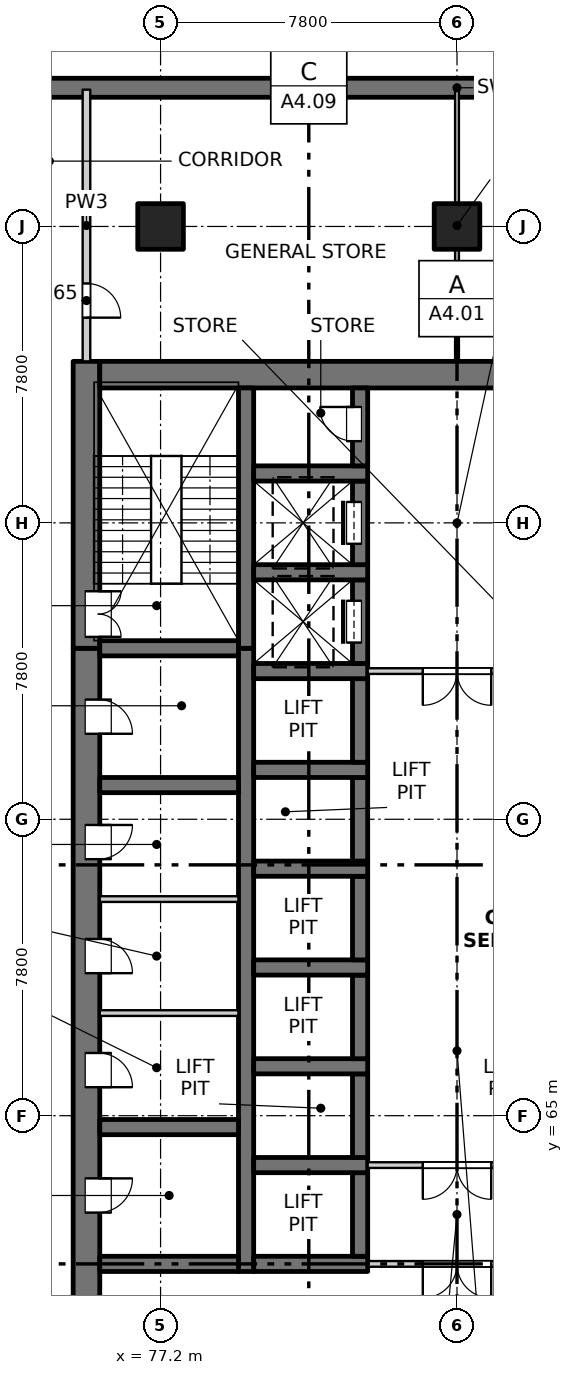
"""IFC4 building model, lengths in metres.
Left out: names, types, materials, properties, quantities, classifications, styles, units other than length and angle.
Written with IfcOpenShell. Run it as: python <this file> out.ifc"""

import sys

from ifc_helpers import new_model, si_unit, direction, frame, frame_2d, origin, origin_2d, place, context, subcontext, project, spatial, rectangle, extrude, element, fill, save


model = new_model("IFC4")
c1 = context("Model", 3, precision=1e-05, world=origin(), true_north=direction((0.0, 1.0)))
c2 = subcontext(c1, "Body", "Model", "MODEL_VIEW")
j1 = project(units=[si_unit("LENGTHUNIT", "METRE"), si_unit("PLANEANGLEUNIT", "RADIAN")], contexts=[c1])
p1 = place(None, origin())
s1 = spatial("IfcSite", under=j1, at=p1, CompositionType="ELEMENT")
p2 = place(p1, origin())
s2 = spatial("IfcBuilding", under=s1, at=p2, CompositionType="ELEMENT")
p3 = place(p2, frame((0.0, 0.0, -4.5)))
s3 = spatial("IfcBuildingStorey", under=s2, at=p3, CompositionType="ELEMENT", Elevation=-4.5)
p4 = place(p3, frame((42.6, 92.05, -0.35), z_axis=(0.0, 0.0, 1.0), x_axis=(1.0, 0.0, 0.0)))
e1 = element("IfcWall", 1, at=p4, inside=s3, PredefinedType="SOLIDWALL", context=c2, shape_type="SweptSolid", body=[
    extrude(rectangle(XDim=84.8, YDim=0.5, at=frame_2d((42.4, 0.0))), origin(), (0.0, 0.0, 1.0), 4.45),
])
for number, where, z_axis, x_axis in (
    (2, (77.2, 88.4, -0.35), (0.0, 0.0, 1.0), (1.0, 0.0, 0.0)),
    (3, (85.0, 88.4, -0.35), (0.0, 0.0, 1.0), (1.0, 0.0, 0.0)),
):
    element("IfcColumn", number, at=place(p3, frame(where, z_axis=z_axis, x_axis=x_axis)), inside=s3, PredefinedType="COLUMN", context=c2, shape_type="SweptSolid", body=[
        extrude(rectangle(XDim=1.2, YDim=1.2, at=origin_2d()), origin(), (0.0, 0.0, 1.0), 4.45),
    ])
p5 = place(p3, frame((75.25, 54.9, -0.35), z_axis=(0.0, 0.0, 1.0), x_axis=(0.0, 1.0, 0.0)))
e4 = element("IfcWall", 4, at=p5, inside=s3, PredefinedType="SOLIDWALL", context=c2, shape_type="SweptSolid", body=[
    extrude(rectangle(XDim=22.4, YDim=0.7, at=frame_2d((11.2, 0.0))), origin(), (0.0, 0.0, 1.0), 4.45),
])
p6 = place(p5, frame((7.55, 0.0, 0.35)))
e5 = element("IfcOpeningElement", 5, at=p6, cuts=e4, PredefinedType="OPENING", context=c2, shape_type="SweptSolid", body=[
    extrude(rectangle(XDim=0.9, YDim=2.1, at=frame_2d((0.45, 1.05))), frame((0.0, 0.36, 0.0), z_axis=(0.0, -1.0, 0.0), x_axis=(1.0, 0.0, 0.0)), (0.0, 0.0, 1.0), 0.72),
])
p7 = place(p5, frame((10.85, 0.0, 0.35)))
e6 = element("IfcOpeningElement", 6, at=p7, cuts=e4, PredefinedType="OPENING", context=c2, shape_type="SweptSolid", body=[
    extrude(rectangle(XDim=0.9, YDim=2.1, at=frame_2d((0.45, 1.05))), frame((0.0, 0.36, 0.0), z_axis=(0.0, -1.0, 0.0), x_axis=(1.0, 0.0, 0.0)), (0.0, 0.0, 1.0), 0.72),
])
p8 = place(p5, frame((13.85, 0.0, 0.35)))
e7 = element("IfcOpeningElement", 7, at=p8, cuts=e4, PredefinedType="OPENING", context=c2, shape_type="SweptSolid", body=[
    extrude(rectangle(XDim=0.9, YDim=2.1, at=frame_2d((0.45, 1.05))), frame((0.0, 0.36, 0.0), z_axis=(0.0, -1.0, 0.0), x_axis=(1.0, 0.0, 0.0)), (0.0, 0.0, 1.0), 0.72),
])
p9 = place(p5, frame((16.85, 0.0, 0.35)))
e8 = element("IfcOpeningElement", 8, at=p9, cuts=e4, PredefinedType="OPENING", context=c2, shape_type="SweptSolid", body=[
    extrude(rectangle(XDim=0.9, YDim=2.1, at=frame_2d((0.45, 1.05))), frame((0.0, 0.36, 0.0), z_axis=(0.0, -1.0, 0.0), x_axis=(1.0, 0.0, 0.0)), (0.0, 0.0, 1.0), 0.72),
])
p10 = place(p5, frame((20.15, 0.0, 0.35)))
e9 = element("IfcOpeningElement", 9, at=p10, cuts=e4, PredefinedType="OPENING", context=c2, shape_type="SweptSolid", body=[
    extrude(rectangle(XDim=0.9, YDim=2.1, at=frame_2d((0.45, 1.05))), frame((0.0, 0.36, 0.0), z_axis=(0.0, -1.0, 0.0), x_axis=(1.0, 0.0, 0.0)), (0.0, 0.0, 1.0), 0.72),
])
p11 = place(p3, frame((75.25, 77.3, -0.35), z_axis=(0.0, 0.0, 1.0), x_axis=(0.0, 1.0, 0.0)))
e10 = element("IfcWall", 10, at=p11, inside=s3, PredefinedType="SOLIDWALL", context=c2, shape_type="SweptSolid", body=[
    extrude(rectangle(XDim=7.55, YDim=0.7, at=frame_2d((3.775, 0.0))), origin(), (0.0, 0.0, 1.0), 4.45),
])
p12 = place(p11, frame((0.3, 0.0, 0.35)))
e11 = element("IfcOpeningElement", 11, at=p12, cuts=e10, PredefinedType="OPENING", context=c2, shape_type="SweptSolid", body=[
    extrude(rectangle(XDim=1.2, YDim=2.1, at=frame_2d((0.6, 1.05))), frame((0.0, 0.36, 0.0), z_axis=(0.0, -1.0, 0.0), x_axis=(1.0, 0.0, 0.0)), (0.0, 0.0, 1.0), 0.72),
])
p13 = place(p3, frame((75.6, 84.5, -0.35), z_axis=(0.0, 0.0, 1.0), x_axis=(1.0, 0.0, 0.0)))
e12 = element("IfcWall", 12, at=p13, inside=s3, PredefinedType="SOLIDWALL", context=c2, shape_type="SweptSolid", body=[
    extrude(rectangle(XDim=18.8, YDim=0.7, at=frame_2d((9.4, 0.0))), origin(), (0.0, 0.0, 1.0), 4.45),
])
p14 = place(p3, frame((79.45, 60.9, -0.35), z_axis=(0.0, 0.0, 1.0), x_axis=(0.0, 1.0, 0.0)))
e13 = element("IfcWall", 13, at=p14, inside=s3, PredefinedType="SOLIDWALL", context=c2, shape_type="SweptSolid", body=[
    extrude(rectangle(XDim=16.4, YDim=0.4, at=frame_2d((8.2, 0.0))), origin(), (0.0, 0.0, 1.0), 4.45),
])
p15 = place(p3, frame((79.45, 77.3, -0.35), z_axis=(0.0, 0.0, 1.0), x_axis=(0.0, 1.0, 0.0)))
e14 = element("IfcWall", 14, at=p15, inside=s3, PredefinedType="SOLIDWALL", context=c2, shape_type="SweptSolid", body=[
    extrude(rectangle(XDim=6.85, YDim=0.4, at=frame_2d((3.425, 0.0))), origin(), (0.0, 0.0, 1.0), 4.45),
])
p16 = place(p3, frame((79.65, 61.1, -0.35), z_axis=(0.0, 0.0, 1.0), x_axis=(1.0, 0.0, 0.0)))
e15 = element("IfcWall", 15, at=p16, inside=s3, PredefinedType="SOLIDWALL", context=c2, shape_type="SweptSolid", body=[
    extrude(rectangle(XDim=3.0, YDim=0.4, at=frame_2d((1.5, 0.0))), origin(), (0.0, 0.0, 1.0), 4.45),
])
p17 = place(p3, frame((82.45, 61.3, -0.35), z_axis=(0.0, 0.0, 1.0), x_axis=(0.0, 1.0, 0.0)))
e16 = element("IfcWall", 16, at=p17, inside=s3, PredefinedType="SOLIDWALL", context=c2, shape_type="SweptSolid", body=[
    extrude(rectangle(XDim=2.2, YDim=0.4, at=frame_2d((1.1, 0.0))), origin(), (0.0, 0.0, 1.0), 4.45),
])
p18 = place(p3, frame((79.65, 63.7, -0.35), z_axis=(0.0, 0.0, 1.0), x_axis=(1.0, 0.0, 0.0)))
e17 = element("IfcWall", 17, at=p18, inside=s3, PredefinedType="SOLIDWALL", context=c2, shape_type="SweptSolid", body=[
    extrude(rectangle(XDim=3.0, YDim=0.4, at=frame_2d((1.5, 0.0))), origin(), (0.0, 0.0, 1.0), 4.45),
])
p19 = place(p3, frame((82.45, 63.9, -0.35), z_axis=(0.0, 0.0, 1.0), x_axis=(0.0, 1.0, 0.0)))
e18 = element("IfcWall", 18, at=p19, inside=s3, PredefinedType="SOLIDWALL", context=c2, shape_type="SweptSolid", body=[
    extrude(rectangle(XDim=2.2, YDim=0.4, at=frame_2d((1.1, 0.0))), origin(), (0.0, 0.0, 1.0), 4.45),
])
p20 = place(p3, frame((79.65, 66.3, -0.35), z_axis=(0.0, 0.0, 1.0), x_axis=(1.0, 0.0, 0.0)))
e19 = element("IfcWall", 19, at=p20, inside=s3, PredefinedType="SOLIDWALL", context=c2, shape_type="SweptSolid", body=[
    extrude(rectangle(XDim=3.0, YDim=0.4, at=frame_2d((1.5, 0.0))), origin(), (0.0, 0.0, 1.0), 4.45),
])
p21 = place(p3, frame((82.45, 66.5, -0.35), z_axis=(0.0, 0.0, 1.0), x_axis=(0.0, 1.0, 0.0)))
e20 = element("IfcWall", 20, at=p21, inside=s3, PredefinedType="SOLIDWALL", context=c2, shape_type="SweptSolid", body=[
    extrude(rectangle(XDim=2.2, YDim=0.4, at=frame_2d((1.1, 0.0))), origin(), (0.0, 0.0, 1.0), 4.45),
])
p22 = place(p3, frame((79.65, 68.9, -0.35), z_axis=(0.0, 0.0, 1.0), x_axis=(1.0, 0.0, 0.0)))
e21 = element("IfcWall", 21, at=p22, inside=s3, PredefinedType="SOLIDWALL", context=c2, shape_type="SweptSolid", body=[
    extrude(rectangle(XDim=3.0, YDim=0.4, at=frame_2d((1.5, 0.0))), origin(), (0.0, 0.0, 1.0), 4.45),
])
p23 = place(p3, frame((82.45, 69.1, -0.35), z_axis=(0.0, 0.0, 1.0), x_axis=(0.0, 1.0, 0.0)))
e22 = element("IfcWall", 22, at=p23, inside=s3, PredefinedType="SOLIDWALL", context=c2, shape_type="SweptSolid", body=[
    extrude(rectangle(XDim=2.2, YDim=0.4, at=frame_2d((1.1, 0.0))), origin(), (0.0, 0.0, 1.0), 4.45),
])
p24 = place(p3, frame((79.65, 71.5, -0.35), z_axis=(0.0, 0.0, 1.0), x_axis=(1.0, 0.0, 0.0)))
e23 = element("IfcWall", 23, at=p24, inside=s3, PredefinedType="SOLIDWALL", context=c2, shape_type="SweptSolid", body=[
    extrude(rectangle(XDim=3.0, YDim=0.4, at=frame_2d((1.5, 0.0))), origin(), (0.0, 0.0, 1.0), 4.45),
])
p25 = place(p3, frame((82.45, 71.7, -0.35), z_axis=(0.0, 0.0, 1.0), x_axis=(0.0, 1.0, 0.0)))
e24 = element("IfcWall", 24, at=p25, inside=s3, PredefinedType="SOLIDWALL", context=c2, shape_type="SweptSolid", body=[
    extrude(rectangle(XDim=2.2, YDim=0.4, at=frame_2d((1.1, 0.0))), origin(), (0.0, 0.0, 1.0), 4.45),
])
p26 = place(p3, frame((79.65, 74.1, -0.35), z_axis=(0.0, 0.0, 1.0), x_axis=(1.0, 0.0, 0.0)))
e25 = element("IfcWall", 25, at=p26, inside=s3, PredefinedType="SOLIDWALL", context=c2, shape_type="SweptSolid", body=[
    extrude(rectangle(XDim=3.0, YDim=0.4, at=frame_2d((1.5, 0.0))), origin(), (0.0, 0.0, 1.0), 4.45),
])
p27 = place(p3, frame((82.45, 74.3, -0.35), z_axis=(0.0, 0.0, 1.0), x_axis=(0.0, 1.0, 0.0)))
e26 = element("IfcWall", 26, at=p27, inside=s3, PredefinedType="SOLIDWALL", context=c2, shape_type="SweptSolid", body=[
    extrude(rectangle(XDim=2.2, YDim=0.4, at=frame_2d((1.1, 0.0))), origin(), (0.0, 0.0, 1.0), 4.45),
])
p28 = place(p3, frame((79.65, 76.7, -0.35), z_axis=(0.0, 0.0, 1.0), x_axis=(1.0, 0.0, 0.0)))
e27 = element("IfcWall", 27, at=p28, inside=s3, PredefinedType="SOLIDWALL", context=c2, shape_type="SweptSolid", body=[
    extrude(rectangle(XDim=3.0, YDim=0.4, at=frame_2d((1.5, 0.0))), origin(), (0.0, 0.0, 1.0), 4.45),
])
p29 = place(p3, frame((82.45, 76.9, -0.35), z_axis=(0.0, 0.0, 1.0), x_axis=(0.0, 1.0, 0.0)))
e28 = element("IfcWall", 28, at=p29, inside=s3, PredefinedType="SOLIDWALL", context=c2, shape_type="SweptSolid", body=[
    extrude(rectangle(XDim=2.2, YDim=0.4, at=frame_2d((1.1, 0.0))), origin(), (0.0, 0.0, 1.0), 4.45),
])
p30 = place(p29, frame((0.55, 0.0, 0.35)))
e29 = element("IfcOpeningElement", 29, at=p30, cuts=e28, PredefinedType="OPENING", context=c2, shape_type="SweptSolid", body=[
    extrude(rectangle(XDim=1.1, YDim=2.1, at=frame_2d((0.55, 1.05))), frame((0.0, 0.21, 0.0), z_axis=(0.0, -1.0, 0.0), x_axis=(1.0, 0.0, 0.0)), (0.0, 0.0, 1.0), 0.42),
])
p31 = place(p3, frame((79.65, 79.3, -0.35), z_axis=(0.0, 0.0, 1.0), x_axis=(1.0, 0.0, 0.0)))
e30 = element("IfcWall", 30, at=p31, inside=s3, PredefinedType="SOLIDWALL", context=c2, shape_type="SweptSolid", body=[
    extrude(rectangle(XDim=3.0, YDim=0.4, at=frame_2d((1.5, 0.0))), origin(), (0.0, 0.0, 1.0), 4.45),
])
p32 = place(p3, frame((82.45, 79.5, -0.35), z_axis=(0.0, 0.0, 1.0), x_axis=(0.0, 1.0, 0.0)))
e31 = element("IfcWall", 31, at=p32, inside=s3, PredefinedType="SOLIDWALL", context=c2, shape_type="SweptSolid", body=[
    extrude(rectangle(XDim=2.2, YDim=0.4, at=frame_2d((1.1, 0.0))), origin(), (0.0, 0.0, 1.0), 4.45),
])
p33 = place(p32, frame((0.55, 0.0, 0.35)))
e32 = element("IfcOpeningElement", 32, at=p33, cuts=e31, PredefinedType="OPENING", context=c2, shape_type="SweptSolid", body=[
    extrude(rectangle(XDim=1.1, YDim=2.1, at=frame_2d((0.55, 1.05))), frame((0.0, 0.21, 0.0), z_axis=(0.0, -1.0, 0.0), x_axis=(1.0, 0.0, 0.0)), (0.0, 0.0, 1.0), 0.42),
])
p34 = place(p3, frame((79.65, 81.9, -0.35), z_axis=(0.0, 0.0, 1.0), x_axis=(1.0, 0.0, 0.0)))
e33 = element("IfcWall", 33, at=p34, inside=s3, PredefinedType="SOLIDWALL", context=c2, shape_type="SweptSolid", body=[
    extrude(rectangle(XDim=3.0, YDim=0.4, at=frame_2d((1.5, 0.0))), origin(), (0.0, 0.0, 1.0), 4.45),
])
p35 = place(p3, frame((82.45, 82.1, -0.35), z_axis=(0.0, 0.0, 1.0), x_axis=(0.0, 1.0, 0.0)))
e34 = element("IfcWall", 34, at=p35, inside=s3, PredefinedType="SOLIDWALL", context=c2, shape_type="SweptSolid", body=[
    extrude(rectangle(XDim=2.05, YDim=0.4, at=frame_2d((1.025, 0.0))), origin(), (0.0, 0.0, 1.0), 4.45),
])
p36 = place(p35, frame((0.65, 0.0, 0.35)))
e35 = element("IfcOpeningElement", 35, at=p36, cuts=e34, PredefinedType="OPENING", context=c2, shape_type="SweptSolid", body=[
    extrude(rectangle(XDim=0.9, YDim=2.1, at=frame_2d((0.45, 1.05))), frame((0.0, 0.21, 0.0), z_axis=(0.0, -1.0, 0.0), x_axis=(1.0, 0.0, 0.0)), (0.0, 0.0, 1.0), 0.42),
])
for number, where, z_axis, x_axis in (
    (36, (75.6, 61.1, -0.35), (0.0, 0.0, 1.0), (1.0, 0.0, 0.0)),
    (37, (75.6, 64.7, -0.35), (0.0, 0.0, 1.0), (1.0, 0.0, 0.0)),
    (38, (75.6, 73.7, -0.35), (0.0, 0.0, 1.0), (1.0, 0.0, 0.0)),
    (39, (75.6, 77.3, -0.35), (0.0, 0.0, 1.0), (1.0, 0.0, 0.0)),
):
    element("IfcWall", number, at=place(p3, frame(where, z_axis=z_axis, x_axis=x_axis)), inside=s3, PredefinedType="SOLIDWALL", context=c2, shape_type="SweptSolid", body=[
        extrude(rectangle(XDim=3.65, YDim=0.4, at=frame_2d((1.825, 0.0))), origin(), (0.0, 0.0, 1.0), 4.45),
    ])
p37 = place(p3, frame((82.65, 61.1, 0.0), z_axis=(0.0, 0.0, 1.0), x_axis=(1.0, 0.0, 0.0)))
e40 = element("IfcWall", 40, at=p37, inside=s3, PredefinedType="PARTITIONING", context=c2, shape_type="SweptSolid", body=[
    extrude(rectangle(XDim=4.7, YDim=0.15, at=frame_2d((2.35, 0.0))), origin(), (0.0, 0.0, 1.0), 4.1),
])
p38 = place(p37, frame((1.45, 0.0, 0.0)))
e41 = element("IfcOpeningElement", 41, at=p38, cuts=e40, PredefinedType="OPENING", context=c2, shape_type="SweptSolid", body=[
    extrude(rectangle(XDim=1.8, YDim=2.1, at=frame_2d((0.9, 1.05))), frame((0.0, 0.085, 0.0), z_axis=(0.0, -1.0, 0.0), x_axis=(1.0, 0.0, 0.0)), (0.0, 0.0, 1.0), 0.17),
])
p39 = place(p3, frame((82.65, 63.7, 0.0), z_axis=(0.0, 0.0, 1.0), x_axis=(1.0, 0.0, 0.0)))
e42 = element("IfcWall", 42, at=p39, inside=s3, PredefinedType="PARTITIONING", context=c2, shape_type="SweptSolid", body=[
    extrude(rectangle(XDim=4.7, YDim=0.15, at=frame_2d((2.35, 0.0))), origin(), (0.0, 0.0, 1.0), 4.1),
])
p40 = place(p39, frame((1.45, 0.0, 0.0)))
e43 = element("IfcOpeningElement", 43, at=p40, cuts=e42, PredefinedType="OPENING", context=c2, shape_type="SweptSolid", body=[
    extrude(rectangle(XDim=1.8, YDim=2.1, at=frame_2d((0.9, 1.05))), frame((0.0, 0.085, 0.0), z_axis=(0.0, -1.0, 0.0), x_axis=(1.0, 0.0, 0.0)), (0.0, 0.0, 1.0), 0.17),
])
for number, where, z_axis, x_axis in (
    (44, (75.6, 67.7, 0.0), (0.0, 0.0, 1.0), (1.0, 0.0, 0.0)),
    (45, (75.6, 70.7, 0.0), (0.0, 0.0, 1.0), (1.0, 0.0, 0.0)),
):
    element("IfcWall", number, at=place(p3, frame(where, z_axis=z_axis, x_axis=x_axis)), inside=s3, PredefinedType="PARTITIONING", context=c2, shape_type="SweptSolid", body=[
        extrude(rectangle(XDim=3.65, YDim=0.15, at=frame_2d((1.825, 0.0))), origin(), (0.0, 0.0, 1.0), 4.1),
    ])
p41 = place(p3, frame((82.65, 76.7, 0.0), z_axis=(0.0, 0.0, 1.0), x_axis=(1.0, 0.0, 0.0)))
e46 = element("IfcWall", 46, at=p41, inside=s3, PredefinedType="PARTITIONING", context=c2, shape_type="SweptSolid", body=[
    extrude(rectangle(XDim=4.7, YDim=0.15, at=frame_2d((2.35, 0.0))), origin(), (0.0, 0.0, 1.0), 4.1),
])
p42 = place(p41, frame((1.45, 0.0, 0.0)))
e47 = element("IfcOpeningElement", 47, at=p42, cuts=e46, PredefinedType="OPENING", context=c2, shape_type="SweptSolid", body=[
    extrude(rectangle(XDim=1.8, YDim=2.1, at=frame_2d((0.9, 1.05))), frame((0.0, 0.085, 0.0), z_axis=(0.0, -1.0, 0.0), x_axis=(1.0, 0.0, 0.0)), (0.0, 0.0, 1.0), 0.17),
])
p43 = place(p3, frame((75.25, 84.85, 0.0), z_axis=(0.0, 0.0, 1.0), x_axis=(0.0, 1.0, 0.0)))
e48 = element("IfcWall", 48, at=p43, inside=s3, PredefinedType="PARTITIONING", context=c2, shape_type="SweptSolid", body=[
    extrude(rectangle(XDim=7.15, YDim=0.2, at=frame_2d((3.575, 0.0))), origin(), (0.0, 0.0, 1.0), 4.1),
])
p44 = place(p43, frame((1.15, 0.0, 0.0)))
e49 = element("IfcOpeningElement", 49, at=p44, cuts=e48, PredefinedType="OPENING", context=c2, shape_type="SweptSolid", body=[
    extrude(rectangle(XDim=0.9, YDim=2.1, at=frame_2d((0.45, 1.05))), frame((0.0, 0.11, 0.0), z_axis=(0.0, -1.0, 0.0), x_axis=(1.0, 0.0, 0.0)), (0.0, 0.0, 1.0), 0.22),
])
p45 = place(p3, frame((85.0, 84.85, 0.0), z_axis=(0.0, 0.0, 1.0), x_axis=(0.0, 1.0, 0.0)))
e50 = element("IfcWall", 50, at=p45, inside=s3, PredefinedType="PARTITIONING", context=c2, shape_type="SweptSolid", body=[
    extrude(rectangle(XDim=7.15, YDim=0.1, at=frame_2d((3.575, 0.0))), origin(), (0.0, 0.0, 1.0), 4.1),
])
p46 = place(p38, origin())
e51 = element("IfcDoor", 51, at=p46, inside=s3, OperationType="DOUBLE_DOOR_SINGLE_SWING", PredefinedType="DOOR", context=c2, shape_type="SweptSolid", body=[
    extrude(rectangle(XDim=1.8, YDim=2.1, at=frame_2d((0.9, 1.05))), frame((0.0, 0.025, 0.0), z_axis=(0.0, -1.0, 0.0), x_axis=(1.0, 0.0, 0.0)), (0.0, 0.0, 1.0), 0.05),
])
fill(e41, e51)
p47 = place(p6, origin())
e52 = element("IfcDoor", 52, at=p47, inside=s3, OperationType="SINGLE_SWING_LEFT", PredefinedType="DOOR", context=c2, shape_type="SweptSolid", body=[
    extrude(rectangle(XDim=0.9, YDim=2.1, at=frame_2d((0.45, 1.05))), frame((0.0, -0.285, 0.0), z_axis=(0.0, -1.0, 0.0), x_axis=(1.0, 0.0, 0.0)), (0.0, 0.0, 1.0), 0.05),
])
fill(e5, e52)
p48 = place(p40, origin())
e53 = element("IfcDoor", 53, at=p48, inside=s3, OperationType="DOUBLE_DOOR_SINGLE_SWING", PredefinedType="DOOR", context=c2, shape_type="SweptSolid", body=[
    extrude(rectangle(XDim=1.8, YDim=2.1, at=frame_2d((0.9, 1.05))), frame((0.0, 0.025, 0.0), z_axis=(0.0, -1.0, 0.0), x_axis=(1.0, 0.0, 0.0)), (0.0, 0.0, 1.0), 0.05),
])
fill(e43, e53)
p49 = place(p7, origin())
e54 = element("IfcDoor", 54, at=p49, inside=s3, OperationType="SINGLE_SWING_RIGHT", PredefinedType="DOOR", context=c2, shape_type="SweptSolid", body=[
    extrude(rectangle(XDim=0.9, YDim=2.1, at=frame_2d((0.45, 1.05))), frame((0.0, -0.285, 0.0), z_axis=(0.0, -1.0, 0.0), x_axis=(1.0, 0.0, 0.0)), (0.0, 0.0, 1.0), 0.05),
])
fill(e6, e54)
p50 = place(p8, origin())
e55 = element("IfcDoor", 55, at=p50, inside=s3, OperationType="SINGLE_SWING_RIGHT", PredefinedType="DOOR", context=c2, shape_type="SweptSolid", body=[
    extrude(rectangle(XDim=0.9, YDim=2.1, at=frame_2d((0.45, 1.05))), frame((0.0, -0.285, 0.0), z_axis=(0.0, -1.0, 0.0), x_axis=(1.0, 0.0, 0.0)), (0.0, 0.0, 1.0), 0.05),
])
fill(e7, e55)
p51 = place(p9, origin())
e56 = element("IfcDoor", 56, at=p51, inside=s3, OperationType="SINGLE_SWING_LEFT", PredefinedType="DOOR", context=c2, shape_type="SweptSolid", body=[
    extrude(rectangle(XDim=0.9, YDim=2.1, at=frame_2d((0.45, 1.05))), frame((0.0, -0.285, 0.0), z_axis=(0.0, -1.0, 0.0), x_axis=(1.0, 0.0, 0.0)), (0.0, 0.0, 1.0), 0.05),
])
fill(e8, e56)
p52 = place(p10, origin())
e57 = element("IfcDoor", 57, at=p52, inside=s3, OperationType="SINGLE_SWING_RIGHT", PredefinedType="DOOR", context=c2, shape_type="SweptSolid", body=[
    extrude(rectangle(XDim=0.9, YDim=2.1, at=frame_2d((0.45, 1.05))), frame((0.0, -0.285, 0.0), z_axis=(0.0, -1.0, 0.0), x_axis=(1.0, 0.0, 0.0)), (0.0, 0.0, 1.0), 0.05),
])
fill(e9, e57)
p53 = place(p42, origin())
e58 = element("IfcDoor", 58, at=p53, inside=s3, OperationType="DOUBLE_DOOR_SINGLE_SWING", PredefinedType="DOOR", context=c2, shape_type="SweptSolid", body=[
    extrude(rectangle(XDim=1.8, YDim=2.1, at=frame_2d((0.9, 1.05))), frame((0.0, 0.025, 0.0), z_axis=(0.0, -1.0, 0.0), x_axis=(1.0, 0.0, 0.0)), (0.0, 0.0, 1.0), 0.05),
])
fill(e47, e58)
p54 = place(p30, origin())
e59 = element("IfcDoor", 59, at=p54, inside=s3, OperationType="SLIDING_TO_LEFT", PredefinedType="DOOR", context=c2, shape_type="SweptSolid", body=[
    extrude(rectangle(XDim=1.1, YDim=2.1, at=frame_2d((0.55, 1.05))), frame((0.0, 0.185, 0.0), z_axis=(0.0, -1.0, 0.0), x_axis=(1.0, 0.0, 0.0)), (0.0, 0.0, 1.0), 0.05),
])
fill(e29, e59)
p55 = place(p12, origin())
e60 = element("IfcDoor", 60, at=p55, inside=s3, OperationType="DOUBLE_DOOR_SINGLE_SWING", PredefinedType="DOOR", context=c2, shape_type="SweptSolid", body=[
    extrude(rectangle(XDim=1.2, YDim=2.1, at=frame_2d((0.6, 1.05))), frame((0.0, -0.285, 0.0), z_axis=(0.0, -1.0, 0.0), x_axis=(1.0, 0.0, 0.0)), (0.0, 0.0, 1.0), 0.05),
])
fill(e11, e60)
p56 = place(p33, origin())
e61 = element("IfcDoor", 61, at=p56, inside=s3, OperationType="SLIDING_TO_LEFT", PredefinedType="DOOR", context=c2, shape_type="SweptSolid", body=[
    extrude(rectangle(XDim=1.1, YDim=2.1, at=frame_2d((0.55, 1.05))), frame((0.0, 0.185, 0.0), z_axis=(0.0, -1.0, 0.0), x_axis=(1.0, 0.0, 0.0)), (0.0, 0.0, 1.0), 0.05),
])
fill(e32, e61)
p57 = place(p36, origin())
e62 = element("IfcDoor", 62, at=p57, inside=s3, OperationType="SINGLE_SWING_RIGHT", PredefinedType="DOOR", context=c2, shape_type="SweptSolid", body=[
    extrude(rectangle(XDim=0.9, YDim=2.1, at=frame_2d((0.45, 1.05))), frame((0.0, 0.185, 0.0), z_axis=(0.0, -1.0, 0.0), x_axis=(1.0, 0.0, 0.0)), (0.0, 0.0, 1.0), 0.05),
])
fill(e35, e62)
p58 = place(p44, origin())
e63 = element("IfcDoor", 63, at=p58, inside=s3, OperationType="SINGLE_SWING_RIGHT", PredefinedType="DOOR", context=c2, shape_type="SweptSolid", body=[
    extrude(rectangle(XDim=0.9, YDim=2.1, at=frame_2d((0.45, 1.05))), frame((0.0, 0.025, 0.0), z_axis=(0.0, -1.0, 0.0), x_axis=(1.0, 0.0, 0.0)), (0.0, 0.0, 1.0), 0.05),
])
fill(e49, e63)
save(model, sys.argv[1])
